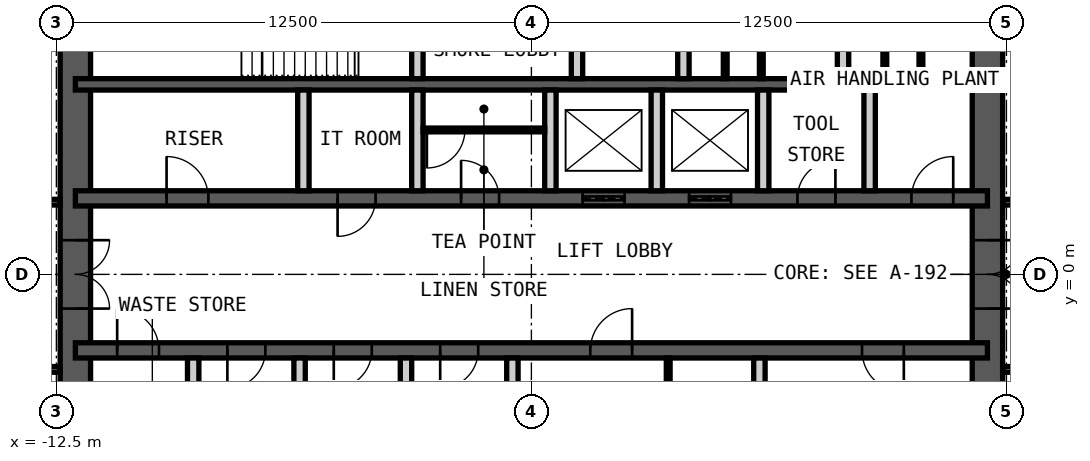
"""IFC4 building model, lengths in metres.
Left out: names, types, materials, properties, quantities, classifications, styles, units other than length and angle.
Written with IfcOpenShell. Run it as: python <this file> out.ifc"""

import sys

from ifc_helpers import new_model, si_unit, direction, frame, frame_2d, origin, place, context, subcontext, project, spatial, rectangle, extrude, element, fill, save


model = new_model("IFC4")
c1 = context("Model", 3, precision=1e-05, world=origin(), true_north=direction((0.0, 1.0)))
c2 = subcontext(c1, "Body", "Model", "MODEL_VIEW")
j1 = project(units=[si_unit("LENGTHUNIT", "METRE"), si_unit("PLANEANGLEUNIT", "RADIAN")], contexts=[c1])
p1 = place(None, origin())
s1 = spatial("IfcSite", under=j1, at=p1, CompositionType="ELEMENT")
p2 = place(p1, origin())
s2 = spatial("IfcBuilding", under=s1, at=p2, CompositionType="ELEMENT")
p3 = place(p2, frame((0.0, 0.0, 329.2)))
s3 = spatial("IfcBuildingStorey", under=s2, at=p3, CompositionType="ELEMENT", Elevation=329.2)
p4 = place(p3, frame((12.0, -9.0, 0.0), z_axis=(0.0, 0.0, 1.0), x_axis=(0.0, 1.0, 0.0)))
e1 = element("IfcWall", 1, at=p4, inside=s3, PredefinedType="SHEAR", context=c2, shape_type="SweptSolid", body=[
    extrude(rectangle(XDim=18.0, YDim=0.8, at=frame_2d((9.0, 0.0))), origin(), (0.0, 0.0, 1.0), 4.2),
])
p5 = place(p4, frame((8.1, 0.0, 0.0)))
e2 = element("IfcOpeningElement", 2, at=p5, cuts=e1, PredefinedType="OPENING", context=c2, shape_type="SweptSolid", body=[
    extrude(rectangle(XDim=1.8, YDim=2.1, at=frame_2d((0.9, 1.05))), frame((0.0, 0.41, 0.0), z_axis=(0.0, -1.0, 0.0), x_axis=(1.0, 0.0, 0.0)), (0.0, 0.0, 1.0), 0.82),
])
p6 = place(p3, frame((-12.0, -9.0, 0.0), z_axis=(0.0, 0.0, 1.0), x_axis=(0.0, 1.0, 0.0)))
e3 = element("IfcWall", 3, at=p6, inside=s3, PredefinedType="SHEAR", context=c2, shape_type="SweptSolid", body=[
    extrude(rectangle(XDim=18.0, YDim=0.8, at=frame_2d((9.0, 0.0))), origin(), (0.0, 0.0, 1.0), 4.2),
])
p7 = place(p6, frame((8.1, 0.0, 0.0)))
e4 = element("IfcOpeningElement", 4, at=p7, cuts=e3, PredefinedType="OPENING", context=c2, shape_type="SweptSolid", body=[
    extrude(rectangle(XDim=1.8, YDim=2.1, at=frame_2d((0.9, 1.05))), frame((0.0, 0.41, 0.0), z_axis=(0.0, -1.0, 0.0), x_axis=(1.0, 0.0, 0.0)), (0.0, 0.0, 1.0), 0.82),
])
p8 = place(p3, frame((-12.0, 5.0, 0.0), z_axis=(0.0, 0.0, 1.0), x_axis=(1.0, 0.0, 0.0)))
e5 = element("IfcWall", 5, at=p8, inside=s3, PredefinedType="SHEAR", context=c2, shape_type="SweptSolid", body=[
    extrude(rectangle(XDim=24.0, YDim=0.3, at=frame_2d((12.0, 0.0))), origin(), (0.0, 0.0, 1.0), 4.2),
])
p9 = place(p3, frame((-12.0, 2.0, 0.0), z_axis=(0.0, 0.0, 1.0), x_axis=(1.0, 0.0, 0.0)))
e6 = element("IfcWall", 6, at=p9, inside=s3, PredefinedType="SHEAR", context=c2, shape_type="SweptSolid", body=[
    extrude(rectangle(XDim=24.0, YDim=0.4, at=frame_2d((12.0, 0.0))), origin(), (0.0, 0.0, 1.0), 4.2),
])
p10 = place(p9, frame((2.4, 0.0, 0.0)))
e7 = element("IfcOpeningElement", 7, at=p10, cuts=e6, PredefinedType="OPENING", context=c2, shape_type="SweptSolid", body=[
    extrude(rectangle(XDim=1.1, YDim=2.1, at=frame_2d((0.55, 1.05))), frame((0.0, 0.21, 0.0), z_axis=(0.0, -1.0, 0.0), x_axis=(1.0, 0.0, 0.0)), (0.0, 0.0, 1.0), 0.42),
])
p11 = place(p9, frame((22.0, 0.0, 0.0)))
e8 = element("IfcOpeningElement", 8, at=p11, cuts=e6, PredefinedType="OPENING", context=c2, shape_type="SweptSolid", body=[
    extrude(rectangle(XDim=1.1, YDim=2.1, at=frame_2d((0.55, 1.05))), frame((0.0, 0.21, 0.0), z_axis=(0.0, -1.0, 0.0), x_axis=(1.0, 0.0, 0.0)), (0.0, 0.0, 1.0), 0.42),
])
p12 = place(p9, frame((10.15, 0.0, 0.0)))
e9 = element("IfcOpeningElement", 9, at=p12, cuts=e6, PredefinedType="OPENING", context=c2, shape_type="SweptSolid", body=[
    extrude(rectangle(XDim=1.0, YDim=2.1, at=frame_2d((0.5, 1.05))), frame((0.0, 0.21, 0.0), z_axis=(0.0, -1.0, 0.0), x_axis=(1.0, 0.0, 0.0)), (0.0, 0.0, 1.0), 0.42),
])
p13 = place(p9, frame((6.9, 0.0, 0.0)))
e10 = element("IfcOpeningElement", 10, at=p13, cuts=e6, PredefinedType="OPENING", context=c2, shape_type="SweptSolid", body=[
    extrude(rectangle(XDim=1.0, YDim=2.1, at=frame_2d((0.5, 1.05))), frame((0.0, 0.21, 0.0), z_axis=(0.0, -1.0, 0.0), x_axis=(1.0, 0.0, 0.0)), (0.0, 0.0, 1.0), 0.42),
])
p14 = place(p9, frame((13.35, 0.0, 0.0)))
e11 = element("IfcOpeningElement", 11, at=p14, cuts=e6, PredefinedType="OPENING", context=c2, shape_type="SweptSolid", body=[
    extrude(rectangle(XDim=1.1, YDim=2.4, at=frame_2d((0.55, 1.2))), frame((0.0, 0.21, 0.0), z_axis=(0.0, -1.0, 0.0), x_axis=(1.0, 0.0, 0.0)), (0.0, 0.0, 1.0), 0.42),
])
p15 = place(p9, frame((16.15, 0.0, 0.0)))
e12 = element("IfcOpeningElement", 12, at=p15, cuts=e6, PredefinedType="OPENING", context=c2, shape_type="SweptSolid", body=[
    extrude(rectangle(XDim=1.1, YDim=2.4, at=frame_2d((0.55, 1.2))), frame((0.0, 0.21, 0.0), z_axis=(0.0, -1.0, 0.0), x_axis=(1.0, 0.0, 0.0)), (0.0, 0.0, 1.0), 0.42),
])
p16 = place(p9, frame((19.0, 0.0, 0.0)))
e13 = element("IfcOpeningElement", 13, at=p16, cuts=e6, PredefinedType="OPENING", context=c2, shape_type="SweptSolid", body=[
    extrude(rectangle(XDim=1.0, YDim=2.1, at=frame_2d((0.5, 1.05))), frame((0.0, 0.21, 0.0), z_axis=(0.0, -1.0, 0.0), x_axis=(1.0, 0.0, 0.0)), (0.0, 0.0, 1.0), 0.42),
])
p17 = place(p3, frame((-12.0, -2.0, 0.0), z_axis=(0.0, 0.0, 1.0), x_axis=(1.0, 0.0, 0.0)))
e14 = element("IfcWall", 14, at=p17, inside=s3, PredefinedType="SHEAR", context=c2, shape_type="SweptSolid", body=[
    extrude(rectangle(XDim=24.0, YDim=0.4, at=frame_2d((12.0, 0.0))), origin(), (0.0, 0.0, 1.0), 4.2),
])
p18 = place(p17, frame((1.1, 0.0, 0.0)))
e15 = element("IfcOpeningElement", 15, at=p18, cuts=e14, PredefinedType="OPENING", context=c2, shape_type="SweptSolid", body=[
    extrude(rectangle(XDim=1.1, YDim=2.1, at=frame_2d((0.55, 1.05))), frame((0.0, 0.21, 0.0), z_axis=(0.0, -1.0, 0.0), x_axis=(1.0, 0.0, 0.0)), (0.0, 0.0, 1.0), 0.42),
])
p19 = place(p17, frame((13.55, 0.0, 0.0)))
e16 = element("IfcOpeningElement", 16, at=p19, cuts=e14, PredefinedType="OPENING", context=c2, shape_type="SweptSolid", body=[
    extrude(rectangle(XDim=1.1, YDim=2.1, at=frame_2d((0.55, 1.05))), frame((0.0, 0.21, 0.0), z_axis=(0.0, -1.0, 0.0), x_axis=(1.0, 0.0, 0.0)), (0.0, 0.0, 1.0), 0.42),
])
p20 = place(p17, frame((20.7, 0.0, 0.0)))
e17 = element("IfcOpeningElement", 17, at=p20, cuts=e14, PredefinedType="OPENING", context=c2, shape_type="SweptSolid", body=[
    extrude(rectangle(XDim=1.1, YDim=2.1, at=frame_2d((0.55, 1.05))), frame((0.0, 0.21, 0.0), z_axis=(0.0, -1.0, 0.0), x_axis=(1.0, 0.0, 0.0)), (0.0, 0.0, 1.0), 0.42),
])
p21 = place(p17, frame((4.0, 0.0, 0.0)))
e18 = element("IfcOpeningElement", 18, at=p21, cuts=e14, PredefinedType="OPENING", context=c2, shape_type="SweptSolid", body=[
    extrude(rectangle(XDim=1.0, YDim=2.1, at=frame_2d((0.5, 1.05))), frame((0.0, 0.21, 0.0), z_axis=(0.0, -1.0, 0.0), x_axis=(1.0, 0.0, 0.0)), (0.0, 0.0, 1.0), 0.42),
])
p22 = place(p17, frame((6.8, 0.0, 0.0)))
e19 = element("IfcOpeningElement", 19, at=p22, cuts=e14, PredefinedType="OPENING", context=c2, shape_type="SweptSolid", body=[
    extrude(rectangle(XDim=1.0, YDim=2.1, at=frame_2d((0.5, 1.05))), frame((0.0, 0.21, 0.0), z_axis=(0.0, -1.0, 0.0), x_axis=(1.0, 0.0, 0.0)), (0.0, 0.0, 1.0), 0.42),
])
p23 = place(p17, frame((9.6, 0.0, 0.0)))
e20 = element("IfcOpeningElement", 20, at=p23, cuts=e14, PredefinedType="OPENING", context=c2, shape_type="SweptSolid", body=[
    extrude(rectangle(XDim=1.0, YDim=2.1, at=frame_2d((0.5, 1.05))), frame((0.0, 0.21, 0.0), z_axis=(0.0, -1.0, 0.0), x_axis=(1.0, 0.0, 0.0)), (0.0, 0.0, 1.0), 0.42),
])
p24 = place(p3, frame((-3.0, 5.15, 0.0), z_axis=(0.0, 0.0, 1.0), x_axis=(0.0, 1.0, 0.0)))
e21 = element("IfcWall", 21, at=p24, inside=s3, PredefinedType="PARTITIONING", context=c2, shape_type="SweptSolid", body=[
    extrude(rectangle(XDim=3.85, YDim=0.3, at=frame_2d((1.925, 0.0))), origin(), (0.0, 0.0, 1.0), 3.98),
])
p25 = place(p24, frame((1.425, 0.0, 0.0)))
e22 = element("IfcOpeningElement", 22, at=p25, cuts=e21, PredefinedType="OPENING", context=c2, shape_type="SweptSolid", body=[
    extrude(rectangle(XDim=1.0, YDim=2.1, at=frame_2d((0.5, 1.05))), frame((0.0, 0.16, 0.0), z_axis=(0.0, -1.0, 0.0), x_axis=(1.0, 0.0, 0.0)), (0.0, 0.0, 1.0), 0.32),
])
p26 = place(p3, frame((1.2, 5.15, 0.0), z_axis=(0.0, 0.0, 1.0), x_axis=(0.0, 1.0, 0.0)))
e23 = element("IfcWall", 23, at=p26, inside=s3, PredefinedType="PARTITIONING", context=c2, shape_type="SweptSolid", body=[
    extrude(rectangle(XDim=3.85, YDim=0.3, at=frame_2d((1.925, 0.0))), origin(), (0.0, 0.0, 1.0), 3.98),
])
p27 = place(p26, frame((1.375, 0.0, 0.0)))
e24 = element("IfcOpeningElement", 24, at=p27, cuts=e23, PredefinedType="OPENING", context=c2, shape_type="SweptSolid", body=[
    extrude(rectangle(XDim=1.1, YDim=2.4, at=frame_2d((0.55, 1.2))), frame((0.0, 0.16, 0.0), z_axis=(0.0, -1.0, 0.0), x_axis=(1.0, 0.0, 0.0)), (0.0, 0.0, 1.0), 0.32),
])
for number, where, z_axis, x_axis in (
    (25, (4.0, 5.15, 0.0), (0.0, 0.0, 1.0), (0.0, 1.0, 0.0)),
    (26, (8.2, 5.15, 0.0), (0.0, 0.0, 1.0), (0.0, 1.0, 0.0)),
):
    element("IfcWall", number, at=place(p3, frame(where, z_axis=z_axis, x_axis=x_axis)), inside=s3, PredefinedType="PARTITIONING", context=c2, shape_type="SweptSolid", body=[
        extrude(rectangle(XDim=3.85, YDim=0.3, at=frame_2d((1.925, 0.0))), origin(), (0.0, 0.0, 1.0), 3.98),
    ])
for number, where, z_axis, x_axis in (
    (27, (-6.0, 2.2, 0.0), (0.0, 0.0, 1.0), (0.0, 1.0, 0.0)),
    (28, (-3.0, 2.2, 0.0), (0.0, 0.0, 1.0), (0.0, 1.0, 0.0)),
    (29, (0.5, 2.2, 0.0), (0.0, 0.0, 1.0), (0.0, 1.0, 0.0)),
    (30, (3.3, 2.2, 0.0), (0.0, 0.0, 1.0), (0.0, 1.0, 0.0)),
    (31, (6.1, 2.2, 0.0), (0.0, 0.0, 1.0), (0.0, 1.0, 0.0)),
    (32, (8.9, 2.2, 0.0), (0.0, 0.0, 1.0), (0.0, 1.0, 0.0)),
    (33, (-8.9, -4.85, 0.0), (0.0, 0.0, 1.0), (0.0, 1.0, 0.0)),
    (34, (-6.1, -4.85, 0.0), (0.0, 0.0, 1.0), (0.0, 1.0, 0.0)),
    (35, (-3.3, -4.85, 0.0), (0.0, 0.0, 1.0), (0.0, 1.0, 0.0)),
    (36, (-0.5, -4.85, 0.0), (0.0, 0.0, 1.0), (0.0, 1.0, 0.0)),
    (37, (6.0, -4.85, 0.0), (0.0, 0.0, 1.0), (0.0, 1.0, 0.0)),
):
    element("IfcWall", number, at=place(p3, frame(where, z_axis=z_axis, x_axis=x_axis)), inside=s3, PredefinedType="PARTITIONING", context=c2, shape_type="SweptSolid", body=[
        extrude(rectangle(XDim=2.65, YDim=0.3, at=frame_2d((1.325, 0.0))), origin(), (0.0, 0.0, 1.0), 3.98),
    ])
p28 = place(p3, frame((-2.85, 3.8, 0.0), z_axis=(0.0, 0.0, 1.0), x_axis=(1.0, 0.0, 0.0)))
e38 = element("IfcWall", 38, at=p28, inside=s3, PredefinedType="PARTITIONING", context=c2, shape_type="SweptSolid", body=[
    extrude(rectangle(XDim=3.2, YDim=0.1, at=frame_2d((1.6, 0.0))), origin(), (0.0, 0.0, 1.0), 3.98),
])
p29 = place(p28, frame((0.1, 0.0, 0.0)))
e39 = element("IfcOpeningElement", 39, at=p29, cuts=e38, PredefinedType="OPENING", context=c2, shape_type="SweptSolid", body=[
    extrude(rectangle(XDim=1.0, YDim=2.4, at=frame_2d((0.5, 1.2))), frame((0.0, 0.06, 0.0), z_axis=(0.0, -1.0, 0.0), x_axis=(1.0, 0.0, 0.0)), (0.0, 0.0, 1.0), 0.12),
])
p30 = place(p3, frame((3.6, -4.85, 0.0), z_axis=(0.0, 0.0, 1.0), x_axis=(0.0, 1.0, 0.0)))
e40 = element("IfcWall", 40, at=p30, inside=s3, PredefinedType="PARTITIONING", context=c2, shape_type="SweptSolid", body=[
    extrude(rectangle(XDim=2.65, YDim=0.1, at=frame_2d((1.325, 0.0))), origin(), (0.0, 0.0, 1.0), 3.98),
])
p31 = place(p30, frame((0.1, 0.0, 0.0)))
e41 = element("IfcOpeningElement", 41, at=p31, cuts=e40, PredefinedType="OPENING", context=c2, shape_type="SweptSolid", body=[
    extrude(rectangle(XDim=1.0, YDim=2.4, at=frame_2d((0.5, 1.2))), frame((0.0, 0.06, 0.0), z_axis=(0.0, -1.0, 0.0), x_axis=(1.0, 0.0, 0.0)), (0.0, 0.0, 1.0), 0.12),
])
for number, where, z_axis, x_axis in (
    (42, (5.1, 5.15, 0.0), (0.0, 0.0, 1.0), (0.0, 1.0, 0.0)),
    (43, (6.05, 5.15, 0.0), (0.0, 0.0, 1.0), (0.0, 1.0, 0.0)),
    (44, (9.3, 5.15, 0.0), (0.0, 0.0, 1.0), (0.0, 1.0, 0.0)),
    (45, (10.25, 5.15, 0.0), (0.0, 0.0, 1.0), (0.0, 1.0, 0.0)),
):
    element("IfcWall", number, at=place(p3, frame(where, z_axis=z_axis, x_axis=x_axis)), inside=s3, PredefinedType="PARTITIONING", context=c2, shape_type="SweptSolid", body=[
        extrude(rectangle(XDim=1.5, YDim=0.1, at=frame_2d((0.75, 0.0))), origin(), (0.0, 0.0, 1.0), 2.1),
    ])
p32 = place(p3, frame((12.4, 1.9, 0.0), z_axis=(0.0, 0.0, 1.0), x_axis=(1.0, 0.0, 0.0)))
e46 = element("IfcWall", 46, at=p32, inside=s3, PredefinedType="PARTITIONING", context=c2, shape_type="SweptSolid", body=[
    extrude(rectangle(XDim=2.1, YDim=0.15, at=frame_2d((1.05, 0.0))), origin(), (0.0, 0.0, 1.0), 2.93),
])
p33 = place(p3, frame((12.4, -2.5, 0.0), z_axis=(0.0, 0.0, 1.0), x_axis=(1.0, 0.0, 0.0)))
e47 = element("IfcWall", 47, at=p33, inside=s3, PredefinedType="PARTITIONING", context=c2, shape_type="SweptSolid", body=[
    extrude(rectangle(XDim=2.1, YDim=0.15, at=frame_2d((1.05, 0.0))), origin(), (0.0, 0.0, 1.0), 3.33),
])
for number, where, z_axis, x_axis in (
    (48, (-12.4, 1.9, 0.0), (0.0, 0.0, 1.0), (-1.0, 0.0, 0.0)),
    (49, (-12.4, -2.5, 0.0), (0.0, 0.0, 1.0), (-1.0, 0.0, 0.0)),
):
    element("IfcWall", number, at=place(p3, frame(where, z_axis=z_axis, x_axis=x_axis)), inside=s3, PredefinedType="PARTITIONING", context=c2, shape_type="SweptSolid", body=[
        extrude(rectangle(XDim=2.1, YDim=0.15, at=frame_2d((1.05, 0.0))), origin(), (0.0, 0.0, 1.0), 3.53),
    ])
p34 = place(p10, origin())
e50 = element("IfcDoor", 50, at=p34, inside=s3, OperationType="SINGLE_SWING_RIGHT", PredefinedType="DOOR", context=c2, shape_type="SweptSolid", body=[
    extrude(rectangle(XDim=1.1, YDim=2.1, at=frame_2d((0.55, 1.05))), frame((0.0, 0.025, 0.0), z_axis=(0.0, -1.0, 0.0), x_axis=(1.0, 0.0, 0.0)), (0.0, 0.0, 1.0), 0.05),
])
fill(e7, e50)
p35 = place(p18, origin())
e51 = element("IfcDoor", 51, at=p35, inside=s3, OperationType="SINGLE_SWING_RIGHT", PredefinedType="DOOR", context=c2, shape_type="SweptSolid", body=[
    extrude(rectangle(XDim=1.1, YDim=2.1, at=frame_2d((0.55, 1.05))), frame((0.0, 0.025, 0.0), z_axis=(0.0, -1.0, 0.0), x_axis=(1.0, 0.0, 0.0)), (0.0, 0.0, 1.0), 0.05),
])
fill(e15, e51)
p36 = place(p11, origin())
e52 = element("IfcDoor", 52, at=p36, inside=s3, OperationType="SINGLE_SWING_LEFT", PredefinedType="DOOR", context=c2, shape_type="SweptSolid", body=[
    extrude(rectangle(XDim=1.1, YDim=2.1, at=frame_2d((0.55, 1.05))), frame((0.0, 0.025, 0.0), z_axis=(0.0, -1.0, 0.0), x_axis=(1.0, 0.0, 0.0)), (0.0, 0.0, 1.0), 0.05),
])
fill(e8, e52)
p37 = place(p12, origin())
e53 = element("IfcDoor", 53, at=p37, inside=s3, OperationType="SINGLE_SWING_RIGHT", PredefinedType="DOOR", context=c2, shape_type="SweptSolid", body=[
    extrude(rectangle(XDim=1.0, YDim=2.1, at=frame_2d((0.5, 1.05))), frame((0.0, 0.025, 0.0), z_axis=(0.0, -1.0, 0.0), x_axis=(1.0, 0.0, 0.0)), (0.0, 0.0, 1.0), 0.05),
])
fill(e9, e53)
p38 = place(p19, origin())
e54 = element("IfcDoor", 54, at=p38, inside=s3, OperationType="SINGLE_SWING_LEFT", PredefinedType="DOOR", context=c2, shape_type="SweptSolid", body=[
    extrude(rectangle(XDim=1.1, YDim=2.1, at=frame_2d((0.55, 1.05))), frame((0.0, 0.025, 0.0), z_axis=(0.0, -1.0, 0.0), x_axis=(1.0, 0.0, 0.0)), (0.0, 0.0, 1.0), 0.05),
])
fill(e16, e54)
p39 = place(p20, origin())
e55 = element("IfcDoor", 55, at=p39, inside=s3, OperationType="SINGLE_SWING_RIGHT", PredefinedType="DOOR", context=c2, shape_type="SweptSolid", body=[
    extrude(rectangle(XDim=1.1, YDim=2.1, at=frame_2d((0.55, 1.05))), frame((0.0, 0.025, 0.0), z_axis=(0.0, -1.0, 0.0), x_axis=(1.0, 0.0, 0.0)), (0.0, 0.0, 1.0), 0.05),
])
fill(e17, e55)
p40 = place(p5, origin())
e56 = element("IfcDoor", 56, at=p40, inside=s3, OperationType="DOUBLE_DOOR_DOUBLE_SWING", PredefinedType="DOOR", context=c2, shape_type="SweptSolid", body=[
    extrude(rectangle(XDim=1.8, YDim=2.1, at=frame_2d((0.9, 1.05))), frame((0.0, 0.025, 0.0), z_axis=(0.0, -1.0, 0.0), x_axis=(1.0, 0.0, 0.0)), (0.0, 0.0, 1.0), 0.05),
])
fill(e2, e56)
p41 = place(p7, origin())
e57 = element("IfcDoor", 57, at=p41, inside=s3, OperationType="DOUBLE_DOOR_DOUBLE_SWING", PredefinedType="DOOR", context=c2, shape_type="SweptSolid", body=[
    extrude(rectangle(XDim=1.8, YDim=2.1, at=frame_2d((0.9, 1.05))), frame((0.0, 0.025, 0.0), z_axis=(0.0, -1.0, 0.0), x_axis=(1.0, 0.0, 0.0)), (0.0, 0.0, 1.0), 0.05),
])
fill(e4, e57)
p42 = place(p13, origin())
e58 = element("IfcDoor", 58, at=p42, inside=s3, OperationType="SINGLE_SWING_LEFT", PredefinedType="DOOR", context=c2, shape_type="SweptSolid", body=[
    extrude(rectangle(XDim=1.0, YDim=2.1, at=frame_2d((0.5, 1.05))), frame((0.0, 0.025, 0.0), z_axis=(0.0, -1.0, 0.0), x_axis=(1.0, 0.0, 0.0)), (0.0, 0.0, 1.0), 0.05),
])
fill(e10, e58)
p43 = place(p14, origin())
e59 = element("IfcDoor", 59, at=p43, inside=s3, OperationType="DOUBLE_DOOR_SLIDING", PredefinedType="DOOR", context=c2, shape_type="SweptSolid", body=[
    extrude(rectangle(XDim=1.1, YDim=2.4, at=frame_2d((0.55, 1.2))), frame((0.0, 0.025, 0.0), z_axis=(0.0, -1.0, 0.0), x_axis=(1.0, 0.0, 0.0)), (0.0, 0.0, 1.0), 0.05),
])
fill(e11, e59)
p44 = place(p15, origin())
e60 = element("IfcDoor", 60, at=p44, inside=s3, OperationType="DOUBLE_DOOR_SLIDING", PredefinedType="DOOR", context=c2, shape_type="SweptSolid", body=[
    extrude(rectangle(XDim=1.1, YDim=2.4, at=frame_2d((0.55, 1.2))), frame((0.0, 0.025, 0.0), z_axis=(0.0, -1.0, 0.0), x_axis=(1.0, 0.0, 0.0)), (0.0, 0.0, 1.0), 0.05),
])
fill(e12, e60)
p45 = place(p16, origin())
e61 = element("IfcDoor", 61, at=p45, inside=s3, OperationType="SINGLE_SWING_LEFT", PredefinedType="DOOR", context=c2, shape_type="SweptSolid", body=[
    extrude(rectangle(XDim=1.0, YDim=2.1, at=frame_2d((0.5, 1.05))), frame((0.0, 0.025, 0.0), z_axis=(0.0, -1.0, 0.0), x_axis=(1.0, 0.0, 0.0)), (0.0, 0.0, 1.0), 0.05),
])
fill(e13, e61)
p46 = place(p21, origin())
e62 = element("IfcDoor", 62, at=p46, inside=s3, OperationType="SINGLE_SWING_LEFT", PredefinedType="DOOR", context=c2, shape_type="SweptSolid", body=[
    extrude(rectangle(XDim=1.0, YDim=2.1, at=frame_2d((0.5, 1.05))), frame((0.0, 0.025, 0.0), z_axis=(0.0, -1.0, 0.0), x_axis=(1.0, 0.0, 0.0)), (0.0, 0.0, 1.0), 0.05),
])
fill(e18, e62)
p47 = place(p22, origin())
e63 = element("IfcDoor", 63, at=p47, inside=s3, OperationType="SINGLE_SWING_LEFT", PredefinedType="DOOR", context=c2, shape_type="SweptSolid", body=[
    extrude(rectangle(XDim=1.0, YDim=2.1, at=frame_2d((0.5, 1.05))), frame((0.0, 0.025, 0.0), z_axis=(0.0, -1.0, 0.0), x_axis=(1.0, 0.0, 0.0)), (0.0, 0.0, 1.0), 0.05),
])
fill(e19, e63)
p48 = place(p23, origin())
e64 = element("IfcDoor", 64, at=p48, inside=s3, OperationType="SINGLE_SWING_LEFT", PredefinedType="DOOR", context=c2, shape_type="SweptSolid", body=[
    extrude(rectangle(XDim=1.0, YDim=2.1, at=frame_2d((0.5, 1.05))), frame((0.0, 0.025, 0.0), z_axis=(0.0, -1.0, 0.0), x_axis=(1.0, 0.0, 0.0)), (0.0, 0.0, 1.0), 0.05),
])
fill(e20, e64)
p49 = place(p29, origin())
e65 = element("IfcDoor", 65, at=p49, inside=s3, OperationType="SINGLE_SWING_LEFT", PredefinedType="DOOR", context=c2, shape_type="SweptSolid", body=[
    extrude(rectangle(XDim=1.0, YDim=2.4, at=frame_2d((0.5, 1.2))), frame((0.0, 0.025, 0.0), z_axis=(0.0, -1.0, 0.0), x_axis=(1.0, 0.0, 0.0)), (0.0, 0.0, 1.0), 0.05),
])
fill(e39, e65)
save(model, sys.argv[1])
